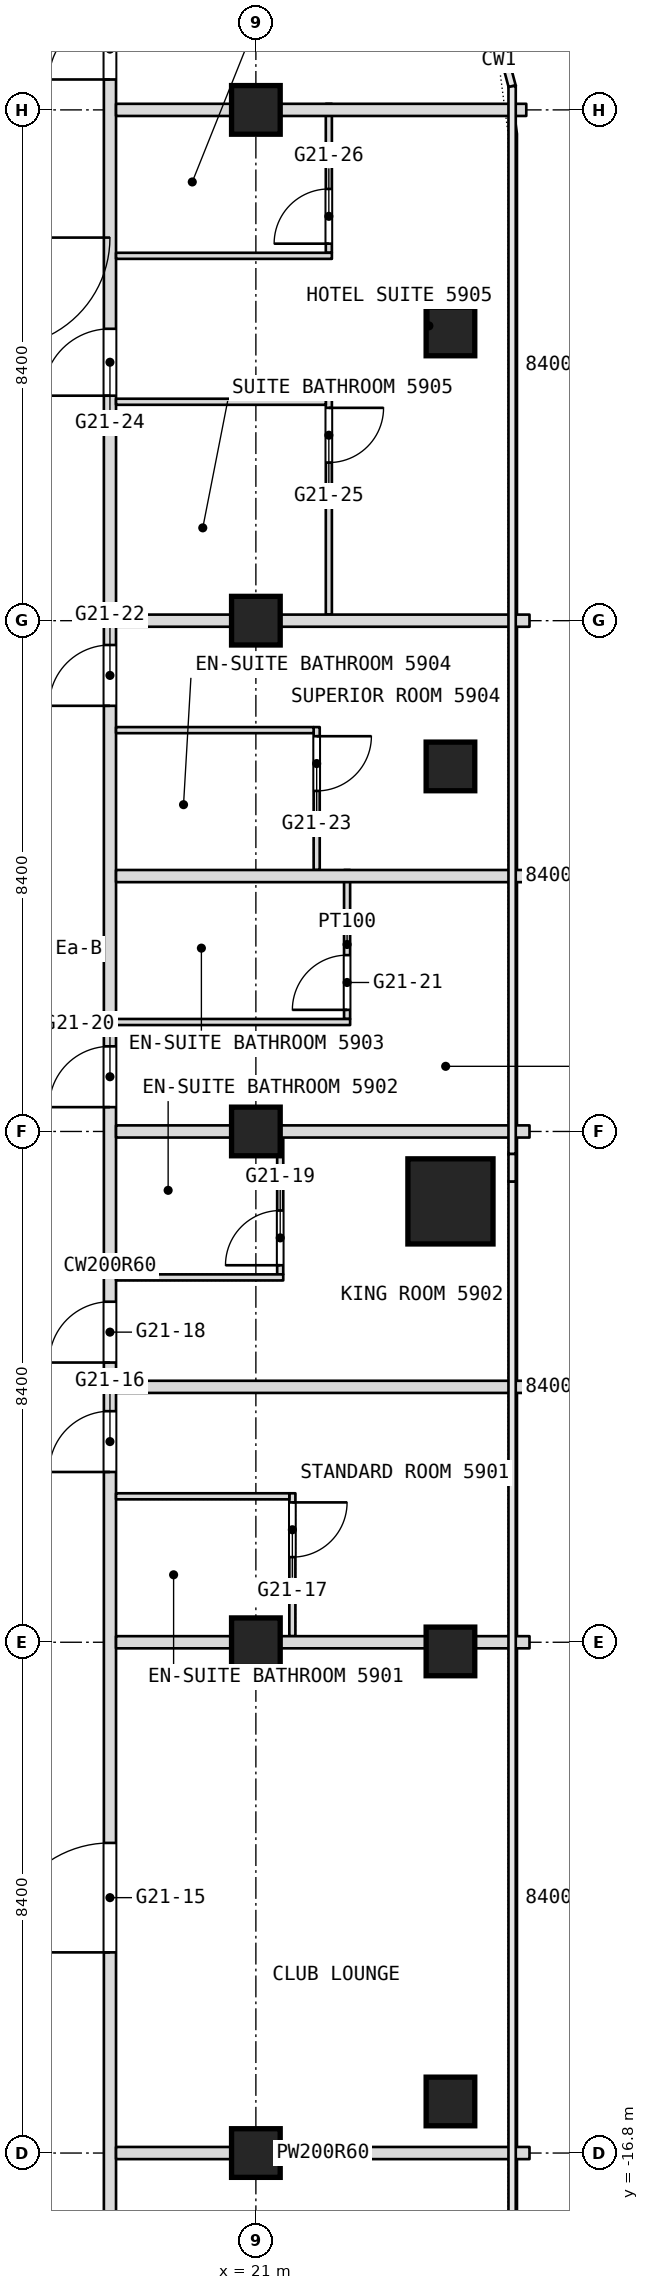
"""IFC4 building model, lengths in metres.
Left out: names, types, materials, properties, quantities, classifications, styles, units other than length and angle.
Written with IfcOpenShell. Run it as: python <this file> out.ifc"""

import sys

from ifc_helpers import new_model, si_unit, direction, frame, frame_2d, origin, origin_2d, place, context, subcontext, project, spatial, rectangle, extrude, element, fill, save


model = new_model("IFC4")
c1 = context("Model", 3, precision=1e-05, world=origin(), true_north=direction((0.0, 1.0)))
c2 = subcontext(c1, "Body", "Model", "MODEL_VIEW")
j1 = project(units=[si_unit("LENGTHUNIT", "METRE"), si_unit("PLANEANGLEUNIT", "RADIAN")], contexts=[c1])
p1 = place(None, origin())
s1 = spatial("IfcSite", under=j1, at=p1, CompositionType="ELEMENT")
p2 = place(p1, origin())
s2 = spatial("IfcBuilding", under=s1, at=p2, CompositionType="ELEMENT")
p3 = place(p2, frame((0.0, 0.0, 248.9)))
s3 = spatial("IfcBuildingStorey", under=s2, at=p3, CompositionType="ELEMENT", Elevation=248.9)
p4 = place(p3, frame((24.2, -1.15, 0.0), z_axis=(0.0, 0.0, 1.0), x_axis=(1.0, 0.0, 0.0)))
e1 = element("IfcColumn", 1, at=p4, inside=s3, PredefinedType="COLUMN", context=c2, shape_type="SweptSolid", body=[
    extrude(rectangle(XDim=1.4, YDim=1.4, at=origin_2d()), origin(), (0.0, 0.0, 1.0), 3.6),
])
for number, where, z_axis, x_axis in (
    (2, (21.0, -16.8, 0.0), (0.0, 0.0, 1.0), (1.0, 0.0, 0.0)),
    (3, (21.0, -8.4, 0.0), (0.0, 0.0, 1.0), (1.0, 0.0, 0.0)),
    (4, (21.0, 0.0, 0.0), (0.0, 0.0, 1.0), (1.0, 0.0, 0.0)),
    (5, (21.0, 8.4, 0.0), (0.0, 0.0, 1.0), (1.0, 0.0, 0.0)),
    (6, (21.0, 16.8, 0.0), (0.0, 0.0, 1.0), (1.0, 0.0, 0.0)),
    (7, (24.2, 13.156, 0.0), (0.0, 0.0, 1.0), (1.0, 0.0, 0.0)),
    (8, (24.2, 6.003, 0.0), (0.0, 0.0, 1.0), (1.0, 0.0, 0.0)),
    (9, (24.2, -8.551, 0.0), (0.0, 0.0, 1.0), (1.0, 0.0, 0.0)),
    (10, (24.2, -15.952, 0.0), (0.0, 0.0, 1.0), (1.0, 0.0, 0.0)),
):
    element("IfcColumn", number, at=place(p3, frame(where, z_axis=z_axis, x_axis=x_axis)), inside=s3, PredefinedType="COLUMN", context=c2, shape_type="SweptSolid", body=[
        extrude(rectangle(XDim=0.8, YDim=0.8, at=origin_2d()), origin(), (0.0, 0.0, 1.0), 3.6),
    ])
p5 = place(p3, frame((22.5, 1.85, 0.0), z_axis=(0.0, 0.0, 1.0), x_axis=(0.0, 1.0, 0.0)))
e11 = element("IfcWall", 11, at=p5, inside=s3, PredefinedType="PARTITIONING", context=c2, shape_type="SweptSolid", body=[
    extrude(rectangle(XDim=2.45, YDim=0.1, at=frame_2d((1.225, 0.0))), origin(), (0.0, 0.0, 1.0), 3.3),
])
p6 = place(p5, frame((0.15, 0.0, 0.0)))
e12 = element("IfcOpeningElement", 12, at=p6, cuts=e11, PredefinedType="OPENING", context=c2, shape_type="SweptSolid", body=[
    extrude(rectangle(XDim=0.9, YDim=2.1, at=frame_2d((0.45, 1.05))), frame((0.0, 0.05, 0.0), z_axis=(0.0, -1.0, 0.0), x_axis=(1.0, 0.0, 0.0)), (0.0, 0.0, 1.0), 0.1),
])
p7 = place(p3, frame((22.2, 8.5, 0.0), z_axis=(0.0, 0.0, 1.0), x_axis=(0.0, 1.0, 0.0)))
e13 = element("IfcWall", 13, at=p7, inside=s3, PredefinedType="PARTITIONING", context=c2, shape_type="SweptSolid", body=[
    extrude(rectangle(XDim=3.55, YDim=0.1, at=frame_2d((1.775, 0.0))), origin(), (0.0, 0.0, 1.0), 3.3),
])
p8 = place(p7, frame((2.5, 0.0, 0.0)))
e14 = element("IfcOpeningElement", 14, at=p8, cuts=e13, PredefinedType="OPENING", context=c2, shape_type="SweptSolid", body=[
    extrude(rectangle(XDim=0.9, YDim=2.1, at=frame_2d((0.45, 1.05))), frame((0.0, 0.05, 0.0), z_axis=(0.0, -1.0, 0.0), x_axis=(1.0, 0.0, 0.0)), (0.0, 0.0, 1.0), 0.1),
])
p9 = place(p3, frame((22.2, 14.45, 0.0), z_axis=(0.0, 0.0, 1.0), x_axis=(0.0, 1.0, 0.0)))
e15 = element("IfcWall", 15, at=p9, inside=s3, PredefinedType="PARTITIONING", context=c2, shape_type="SweptSolid", body=[
    extrude(rectangle(XDim=2.45, YDim=0.1, at=frame_2d((1.225, 0.0))), origin(), (0.0, 0.0, 1.0), 3.3),
])
p10 = place(p9, frame((0.15, 0.0, 0.0)))
e16 = element("IfcOpeningElement", 16, at=p10, cuts=e15, PredefinedType="OPENING", context=c2, shape_type="SweptSolid", body=[
    extrude(rectangle(XDim=0.9, YDim=2.1, at=frame_2d((0.45, 1.05))), frame((0.0, 0.05, 0.0), z_axis=(0.0, -1.0, 0.0), x_axis=(1.0, 0.0, 0.0)), (0.0, 0.0, 1.0), 0.1),
])
p11 = place(p3, frame((22.0, 4.3, 0.0), z_axis=(0.0, 0.0, 1.0), x_axis=(0.0, 1.0, 0.0)))
e17 = element("IfcWall", 17, at=p11, inside=s3, PredefinedType="PARTITIONING", context=c2, shape_type="SweptSolid", body=[
    extrude(rectangle(XDim=2.35, YDim=0.1, at=frame_2d((1.175, 0.0))), origin(), (0.0, 0.0, 1.0), 3.3),
])
p12 = place(p11, frame((1.3, 0.0, 0.0)))
e18 = element("IfcOpeningElement", 18, at=p12, cuts=e17, PredefinedType="OPENING", context=c2, shape_type="SweptSolid", body=[
    extrude(rectangle(XDim=0.9, YDim=2.1, at=frame_2d((0.45, 1.05))), frame((0.0, 0.05, 0.0), z_axis=(0.0, -1.0, 0.0), x_axis=(1.0, 0.0, 0.0)), (0.0, 0.0, 1.0), 0.1),
])
p13 = place(p3, frame((21.6, -8.3, 0.0), z_axis=(0.0, 0.0, 1.0), x_axis=(0.0, 1.0, 0.0)))
e19 = element("IfcWall", 19, at=p13, inside=s3, PredefinedType="PARTITIONING", context=c2, shape_type="SweptSolid", body=[
    extrude(rectangle(XDim=2.35, YDim=0.1, at=frame_2d((1.175, 0.0))), origin(), (0.0, 0.0, 1.0), 3.3),
])
p14 = place(p13, frame((1.3, 0.0, 0.0)))
e20 = element("IfcOpeningElement", 20, at=p14, cuts=e19, PredefinedType="OPENING", context=c2, shape_type="SweptSolid", body=[
    extrude(rectangle(XDim=0.9, YDim=2.1, at=frame_2d((0.45, 1.05))), frame((0.0, 0.05, 0.0), z_axis=(0.0, -1.0, 0.0), x_axis=(1.0, 0.0, 0.0)), (0.0, 0.0, 1.0), 0.1),
])
p15 = place(p3, frame((21.4, -2.35, 0.0), z_axis=(0.0, 0.0, 1.0), x_axis=(0.0, 1.0, 0.0)))
e21 = element("IfcWall", 21, at=p15, inside=s3, PredefinedType="PARTITIONING", context=c2, shape_type="SweptSolid", body=[
    extrude(rectangle(XDim=2.45, YDim=0.1, at=frame_2d((1.225, 0.0))), origin(), (0.0, 0.0, 1.0), 3.3),
])
p16 = place(p15, frame((0.15, 0.0, 0.0)))
e22 = element("IfcOpeningElement", 22, at=p16, cuts=e21, PredefinedType="OPENING", context=c2, shape_type="SweptSolid", body=[
    extrude(rectangle(XDim=0.9, YDim=2.1, at=frame_2d((0.45, 1.05))), frame((0.0, 0.05, 0.0), z_axis=(0.0, -1.0, 0.0), x_axis=(1.0, 0.0, 0.0)), (0.0, 0.0, 1.0), 0.1),
])
p17 = place(p3, frame((18.6, -26.751, 0.0), z_axis=(0.0, 0.0, 1.0), x_axis=(0.0, 1.0, 0.0)))
e23 = element("IfcWall", 23, at=p17, inside=s3, PredefinedType="PARTITIONING", context=c2, shape_type="SweptSolid", body=[
    extrude(rectangle(XDim=49.091, YDim=0.2, at=frame_2d((24.545, 0.0))), origin(), (0.0, 0.0, 1.0), 3.3),
])
p18 = place(p17, frame((4.226, 0.0, 0.0)))
e24 = element("IfcOpeningElement", 24, at=p18, cuts=e23, PredefinedType="OPENING", context=c2, shape_type="SweptSolid", body=[
    extrude(rectangle(XDim=1.8, YDim=2.1, at=frame_2d((0.9, 1.05))), frame((0.0, 0.1, 0.0), z_axis=(0.0, -1.0, 0.0), x_axis=(1.0, 0.0, 0.0)), (0.0, 0.0, 1.0), 0.2),
])
p19 = place(p17, frame((13.251, 0.0, 0.0)))
e25 = element("IfcOpeningElement", 25, at=p19, cuts=e23, PredefinedType="OPENING", context=c2, shape_type="SweptSolid", body=[
    extrude(rectangle(XDim=1.8, YDim=2.1, at=frame_2d((0.9, 1.05))), frame((0.0, 0.1, 0.0), z_axis=(0.0, -1.0, 0.0), x_axis=(1.0, 0.0, 0.0)), (0.0, 0.0, 1.0), 0.2),
])
p20 = place(p17, frame((21.151, 0.0, 0.0)))
e26 = element("IfcOpeningElement", 26, at=p20, cuts=e23, PredefinedType="OPENING", context=c2, shape_type="SweptSolid", body=[
    extrude(rectangle(XDim=1.0, YDim=2.1, at=frame_2d((0.5, 1.05))), frame((0.0, 0.1, 0.0), z_axis=(0.0, -1.0, 0.0), x_axis=(1.0, 0.0, 0.0)), (0.0, 0.0, 1.0), 0.2),
])
p21 = place(p17, frame((22.951, 0.0, 0.0)))
e27 = element("IfcOpeningElement", 27, at=p21, cuts=e23, PredefinedType="OPENING", context=c2, shape_type="SweptSolid", body=[
    extrude(rectangle(XDim=1.0, YDim=2.1, at=frame_2d((0.5, 1.05))), frame((0.0, 0.1, 0.0), z_axis=(0.0, -1.0, 0.0), x_axis=(1.0, 0.0, 0.0)), (0.0, 0.0, 1.0), 0.2),
])
p22 = place(p17, frame((27.151, 0.0, 0.0)))
e28 = element("IfcOpeningElement", 28, at=p22, cuts=e23, PredefinedType="OPENING", context=c2, shape_type="SweptSolid", body=[
    extrude(rectangle(XDim=1.0, YDim=2.1, at=frame_2d((0.5, 1.05))), frame((0.0, 0.1, 0.0), z_axis=(0.0, -1.0, 0.0), x_axis=(1.0, 0.0, 0.0)), (0.0, 0.0, 1.0), 0.2),
])
p23 = place(p17, frame((33.751, 0.0, 0.0)))
e29 = element("IfcOpeningElement", 29, at=p23, cuts=e23, PredefinedType="OPENING", context=c2, shape_type="SweptSolid", body=[
    extrude(rectangle(XDim=1.0, YDim=2.1, at=frame_2d((0.5, 1.05))), frame((0.0, 0.1, 0.0), z_axis=(0.0, -1.0, 0.0), x_axis=(1.0, 0.0, 0.0)), (0.0, 0.0, 1.0), 0.2),
])
p24 = place(p17, frame((38.851, 0.0, 0.0)))
e30 = element("IfcOpeningElement", 30, at=p24, cuts=e23, PredefinedType="OPENING", context=c2, shape_type="SweptSolid", body=[
    extrude(rectangle(XDim=1.1, YDim=2.1, at=frame_2d((0.55, 1.05))), frame((0.0, 0.1, 0.0), z_axis=(0.0, -1.0, 0.0), x_axis=(1.0, 0.0, 0.0)), (0.0, 0.0, 1.0), 0.2),
])
p25 = place(p17, frame((44.051, 0.0, 0.0)))
e31 = element("IfcOpeningElement", 31, at=p25, cuts=e23, PredefinedType="OPENING", context=c2, shape_type="SweptSolid", body=[
    extrude(rectangle(XDim=1.0, YDim=2.1, at=frame_2d((0.5, 1.05))), frame((0.0, 0.1, 0.0), z_axis=(0.0, -1.0, 0.0), x_axis=(1.0, 0.0, 0.0)), (0.0, 0.0, 1.0), 0.2),
])
for number, where, z_axis, x_axis in (
    (32, (18.7, -16.8, 0.0), (0.0, 0.0, 1.0), (1.0, 0.0, 0.0)),
    (33, (18.7, -8.4, 0.0), (0.0, 0.0, 1.0), (1.0, 0.0, 0.0)),
):
    element("IfcWall", number, at=place(p3, frame(where, z_axis=z_axis, x_axis=x_axis)), inside=s3, PredefinedType="PARTITIONING", context=c2, shape_type="SweptSolid", body=[
        extrude(rectangle(XDim=6.8, YDim=0.2, at=frame_2d((3.4, 0.0))), origin(), (0.0, 0.0, 1.0), 2.9),
    ])
p26 = place(p3, frame((18.7, -6.0, 0.0), z_axis=(0.0, 0.0, 1.0), x_axis=(1.0, 0.0, 0.0)))
e34 = element("IfcWall", 34, at=p26, inside=s3, PredefinedType="PARTITIONING", context=c2, shape_type="SweptSolid", body=[
    extrude(rectangle(XDim=2.85, YDim=0.1, at=frame_2d((1.425, 0.0))), origin(), (0.0, 0.0, 1.0), 3.3),
])
p27 = place(p3, frame((18.7, -4.2, 0.0), z_axis=(0.0, 0.0, 1.0), x_axis=(1.0, 0.0, 0.0)))
e35 = element("IfcWall", 35, at=p27, inside=s3, PredefinedType="PARTITIONING", context=c2, shape_type="SweptSolid", body=[
    extrude(rectangle(XDim=6.8, YDim=0.2, at=frame_2d((3.4, 0.0))), origin(), (0.0, 0.0, 1.0), 3.3),
])
p28 = place(p3, frame((18.7, -2.4, 0.0), z_axis=(0.0, 0.0, 1.0), x_axis=(1.0, 0.0, 0.0)))
e36 = element("IfcWall", 36, at=p28, inside=s3, PredefinedType="PARTITIONING", context=c2, shape_type="SweptSolid", body=[
    extrude(rectangle(XDim=2.75, YDim=0.1, at=frame_2d((1.375, 0.0))), origin(), (0.0, 0.0, 1.0), 3.3),
])
p29 = place(p3, frame((18.7, 0.0, 0.0), z_axis=(0.0, 0.0, 1.0), x_axis=(1.0, 0.0, 0.0)))
e37 = element("IfcWall", 37, at=p29, inside=s3, PredefinedType="PARTITIONING", context=c2, shape_type="SweptSolid", body=[
    extrude(rectangle(XDim=6.8, YDim=0.2, at=frame_2d((3.4, 0.0))), origin(), (0.0, 0.0, 1.0), 2.9),
])
p30 = place(p3, frame((18.7, 1.8, 0.0), z_axis=(0.0, 0.0, 1.0), x_axis=(1.0, 0.0, 0.0)))
e38 = element("IfcWall", 38, at=p30, inside=s3, PredefinedType="PARTITIONING", context=c2, shape_type="SweptSolid", body=[
    extrude(rectangle(XDim=3.85, YDim=0.1, at=frame_2d((1.925, 0.0))), origin(), (0.0, 0.0, 1.0), 3.3),
])
p31 = place(p3, frame((18.7, 4.2, 0.0), z_axis=(0.0, 0.0, 1.0), x_axis=(1.0, 0.0, 0.0)))
e39 = element("IfcWall", 39, at=p31, inside=s3, PredefinedType="PARTITIONING", context=c2, shape_type="SweptSolid", body=[
    extrude(rectangle(XDim=6.8, YDim=0.2, at=frame_2d((3.4, 0.0))), origin(), (0.0, 0.0, 1.0), 3.3),
])
p32 = place(p3, frame((18.7, 6.6, 0.0), z_axis=(0.0, 0.0, 1.0), x_axis=(1.0, 0.0, 0.0)))
e40 = element("IfcWall", 40, at=p32, inside=s3, PredefinedType="PARTITIONING", context=c2, shape_type="SweptSolid", body=[
    extrude(rectangle(XDim=3.25, YDim=0.1, at=frame_2d((1.625, 0.0))), origin(), (0.0, 0.0, 1.0), 3.3),
])
p33 = place(p3, frame((18.7, 8.4, 0.0), z_axis=(0.0, 0.0, 1.0), x_axis=(1.0, 0.0, 0.0)))
e41 = element("IfcWall", 41, at=p33, inside=s3, PredefinedType="PARTITIONING", context=c2, shape_type="SweptSolid", body=[
    extrude(rectangle(XDim=6.8, YDim=0.2, at=frame_2d((3.4, 0.0))), origin(), (0.0, 0.0, 1.0), 2.9),
])
p34 = place(p3, frame((18.7, 12.0, 0.0), z_axis=(0.0, 0.0, 1.0), x_axis=(1.0, 0.0, 0.0)))
e42 = element("IfcWall", 42, at=p34, inside=s3, PredefinedType="PARTITIONING", context=c2, shape_type="SweptSolid", body=[
    extrude(rectangle(XDim=3.45, YDim=0.1, at=frame_2d((1.725, 0.0))), origin(), (0.0, 0.0, 1.0), 3.3),
])
p35 = place(p3, frame((18.7, 14.4, 0.0), z_axis=(0.0, 0.0, 1.0), x_axis=(1.0, 0.0, 0.0)))
e43 = element("IfcWall", 43, at=p35, inside=s3, PredefinedType="PARTITIONING", context=c2, shape_type="SweptSolid", body=[
    extrude(rectangle(XDim=3.55, YDim=0.1, at=frame_2d((1.775, 0.0))), origin(), (0.0, 0.0, 1.0), 3.3),
])
p36 = place(p3, frame((18.7, 16.8, 0.0), z_axis=(0.0, 0.0, 1.0), x_axis=(1.0, 0.0, 0.0)))
e44 = element("IfcWall", 44, at=p36, inside=s3, PredefinedType="PARTITIONING", context=c2, shape_type="SweptSolid", body=[
    extrude(rectangle(XDim=6.747, YDim=0.2, at=frame_2d((3.374, 0.0))), origin(), (0.0, 0.0, 1.0), 2.9),
])
p37 = place(p6, origin())
e45 = element("IfcDoor", 45, at=p37, inside=s3, OperationType="SINGLE_SWING_LEFT", PredefinedType="DOOR", context=c2, shape_type="SweptSolid", body=[
    extrude(rectangle(XDim=0.9, YDim=2.1, at=frame_2d((0.45, 1.05))), frame((0.0, 0.025, 0.0), z_axis=(0.0, -1.0, 0.0), x_axis=(1.0, 0.0, 0.0)), (0.0, 0.0, 1.0), 0.05),
])
fill(e12, e45)
p38 = place(p8, origin())
e46 = element("IfcDoor", 46, at=p38, inside=s3, OperationType="SINGLE_SWING_RIGHT", PredefinedType="DOOR", context=c2, shape_type="SweptSolid", body=[
    extrude(rectangle(XDim=0.9, YDim=2.1, at=frame_2d((0.45, 1.05))), frame((0.0, 0.025, 0.0), z_axis=(0.0, -1.0, 0.0), x_axis=(1.0, 0.0, 0.0)), (0.0, 0.0, 1.0), 0.05),
])
fill(e14, e46)
p39 = place(p10, origin())
e47 = element("IfcDoor", 47, at=p39, inside=s3, OperationType="SINGLE_SWING_LEFT", PredefinedType="DOOR", context=c2, shape_type="SweptSolid", body=[
    extrude(rectangle(XDim=0.9, YDim=2.1, at=frame_2d((0.45, 1.05))), frame((0.0, 0.025, 0.0), z_axis=(0.0, -1.0, 0.0), x_axis=(1.0, 0.0, 0.0)), (0.0, 0.0, 1.0), 0.05),
])
fill(e16, e47)
p40 = place(p12, origin())
e48 = element("IfcDoor", 48, at=p40, inside=s3, OperationType="SINGLE_SWING_RIGHT", PredefinedType="DOOR", context=c2, shape_type="SweptSolid", body=[
    extrude(rectangle(XDim=0.9, YDim=2.1, at=frame_2d((0.45, 1.05))), frame((0.0, 0.025, 0.0), z_axis=(0.0, -1.0, 0.0), x_axis=(1.0, 0.0, 0.0)), (0.0, 0.0, 1.0), 0.05),
])
fill(e18, e48)
p41 = place(p14, origin())
e49 = element("IfcDoor", 49, at=p41, inside=s3, OperationType="SINGLE_SWING_RIGHT", PredefinedType="DOOR", context=c2, shape_type="SweptSolid", body=[
    extrude(rectangle(XDim=0.9, YDim=2.1, at=frame_2d((0.45, 1.05))), frame((0.0, 0.025, 0.0), z_axis=(0.0, -1.0, 0.0), x_axis=(1.0, 0.0, 0.0)), (0.0, 0.0, 1.0), 0.05),
])
fill(e20, e49)
p42 = place(p16, origin())
e50 = element("IfcDoor", 50, at=p42, inside=s3, OperationType="SINGLE_SWING_LEFT", PredefinedType="DOOR", context=c2, shape_type="SweptSolid", body=[
    extrude(rectangle(XDim=0.9, YDim=2.1, at=frame_2d((0.45, 1.05))), frame((0.0, 0.025, 0.0), z_axis=(0.0, -1.0, 0.0), x_axis=(1.0, 0.0, 0.0)), (0.0, 0.0, 1.0), 0.05),
])
fill(e22, e50)
p43 = place(p19, origin())
e51 = element("IfcDoor", 51, at=p43, inside=s3, OperationType="DOUBLE_DOOR_SINGLE_SWING", PredefinedType="DOOR", context=c2, shape_type="SweptSolid", body=[
    extrude(rectangle(XDim=1.8, YDim=2.1, at=frame_2d((0.9, 1.05))), frame((0.0, 0.025, 0.0), z_axis=(0.0, -1.0, 0.0), x_axis=(1.0, 0.0, 0.0)), (0.0, 0.0, 1.0), 0.05),
])
fill(e25, e51)
p44 = place(p20, origin())
e52 = element("IfcDoor", 52, at=p44, inside=s3, OperationType="SINGLE_SWING_RIGHT", PredefinedType="DOOR", context=c2, shape_type="SweptSolid", body=[
    extrude(rectangle(XDim=1.0, YDim=2.1, at=frame_2d((0.5, 1.05))), frame((0.0, 0.025, 0.0), z_axis=(0.0, -1.0, 0.0), x_axis=(1.0, 0.0, 0.0)), (0.0, 0.0, 1.0), 0.05),
])
fill(e26, e52)
p45 = place(p21, origin())
e53 = element("IfcDoor", 53, at=p45, inside=s3, OperationType="SINGLE_SWING_RIGHT", PredefinedType="DOOR", context=c2, shape_type="SweptSolid", body=[
    extrude(rectangle(XDim=1.0, YDim=2.1, at=frame_2d((0.5, 1.05))), frame((0.0, 0.025, 0.0), z_axis=(0.0, -1.0, 0.0), x_axis=(1.0, 0.0, 0.0)), (0.0, 0.0, 1.0), 0.05),
])
fill(e27, e53)
p46 = place(p22, origin())
e54 = element("IfcDoor", 54, at=p46, inside=s3, OperationType="SINGLE_SWING_RIGHT", PredefinedType="DOOR", context=c2, shape_type="SweptSolid", body=[
    extrude(rectangle(XDim=1.0, YDim=2.1, at=frame_2d((0.5, 1.05))), frame((0.0, 0.025, 0.0), z_axis=(0.0, -1.0, 0.0), x_axis=(1.0, 0.0, 0.0)), (0.0, 0.0, 1.0), 0.05),
])
fill(e28, e54)
p47 = place(p23, origin())
e55 = element("IfcDoor", 55, at=p47, inside=s3, OperationType="SINGLE_SWING_RIGHT", PredefinedType="DOOR", context=c2, shape_type="SweptSolid", body=[
    extrude(rectangle(XDim=1.0, YDim=2.1, at=frame_2d((0.5, 1.05))), frame((0.0, 0.025, 0.0), z_axis=(0.0, -1.0, 0.0), x_axis=(1.0, 0.0, 0.0)), (0.0, 0.0, 1.0), 0.05),
])
fill(e29, e55)
p48 = place(p24, origin())
e56 = element("IfcDoor", 56, at=p48, inside=s3, OperationType="SINGLE_SWING_RIGHT", PredefinedType="DOOR", context=c2, shape_type="SweptSolid", body=[
    extrude(rectangle(XDim=1.1, YDim=2.1, at=frame_2d((0.55, 1.05))), frame((0.0, 0.025, 0.0), z_axis=(0.0, -1.0, 0.0), x_axis=(1.0, 0.0, 0.0)), (0.0, 0.0, 1.0), 0.05),
])
fill(e30, e56)
p49 = place(p25, origin())
e57 = element("IfcDoor", 57, at=p49, inside=s3, OperationType="SINGLE_SWING_LEFT", PredefinedType="DOOR", context=c2, shape_type="SweptSolid", body=[
    extrude(rectangle(XDim=1.0, YDim=2.1, at=frame_2d((0.5, 1.05))), frame((0.0, 0.025, 0.0), z_axis=(0.0, -1.0, 0.0), x_axis=(1.0, 0.0, 0.0)), (0.0, 0.0, 1.0), 0.05),
])
fill(e31, e57)
save(model, sys.argv[1])
